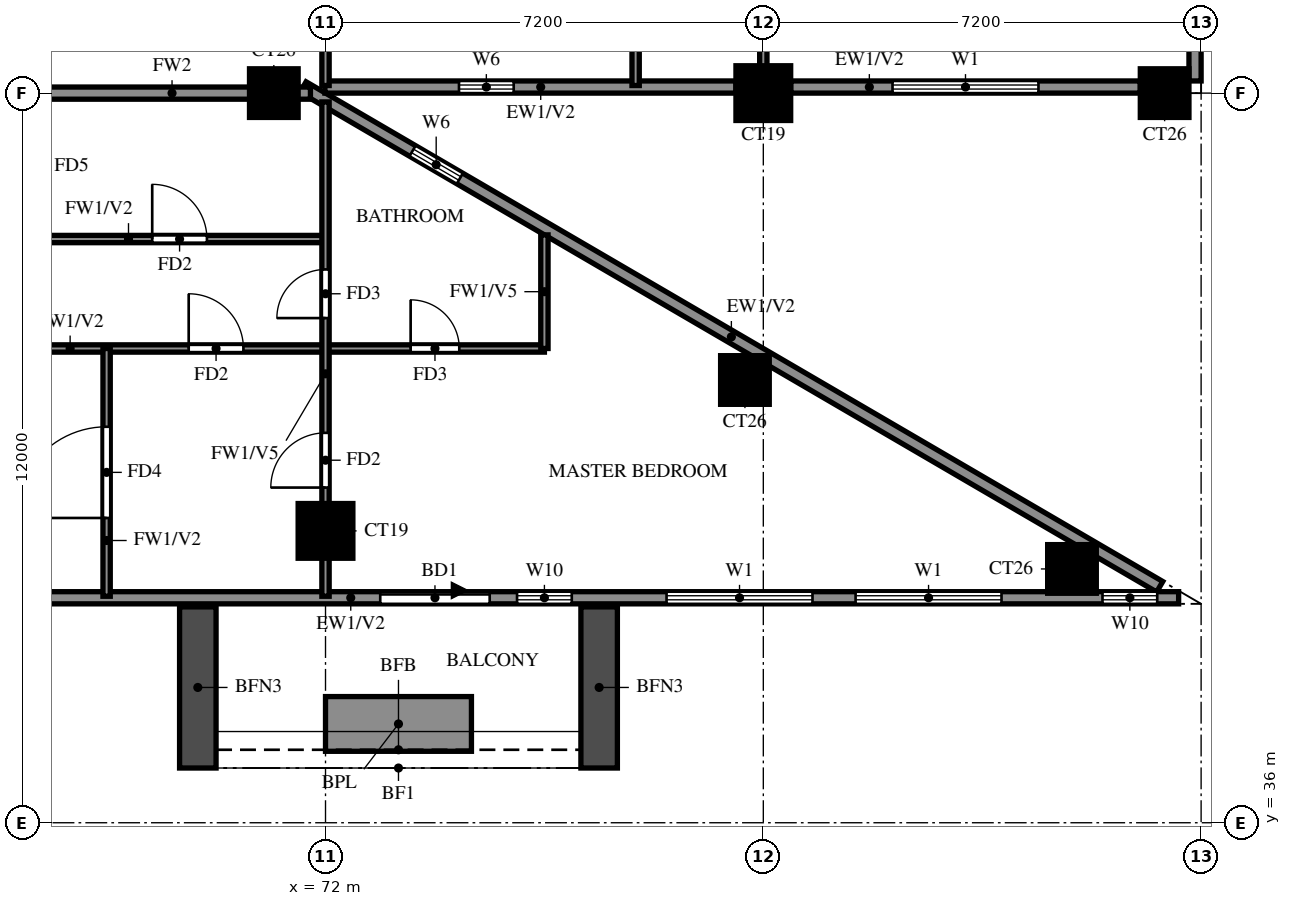
"""IFC4 building model, lengths in metres.
Left out: names, types, materials, properties, quantities, classifications, styles, units other than length and angle.
Written with IfcOpenShell. Run it as: python <this file> out.ifc"""

import sys

from ifc_helpers import new_model, si_unit, direction, frame, frame_2d, origin, origin_2d, place, context, subcontext, project, spatial, rectangle, extrude, source, transform, mapped, element, fill, save


model = new_model("IFC4")
c1 = context("Model", 3, precision=1e-05, world=origin(), true_north=direction((0.0, 1.0)))
c2 = subcontext(c1, "Body", "Model", "MODEL_VIEW")
j1 = project(units=[si_unit("LENGTHUNIT", "METRE"), si_unit("PLANEANGLEUNIT", "RADIAN")], contexts=[c1])
p1 = place(None, origin())
s1 = spatial("IfcSite", under=j1, at=p1, CompositionType="ELEMENT")
p2 = place(p1, origin())
s2 = spatial("IfcBuilding", under=s1, at=p2, CompositionType="ELEMENT")
p3 = place(p2, frame((0.0, 0.0, 181.5)))
s3 = spatial("IfcBuildingStorey", under=s2, at=p3, CompositionType="ELEMENT", Elevation=181.5)
m1 = source(origin(), c2, "Body", "SweptSolid", [
    extrude(rectangle(XDim=0.8, YDim=0.8, at=origin_2d()), origin(), (0.0, 0.0, 1.0), 3.2),
])
p4 = place(p3, frame((84.276, 40.174, 0.0), z_axis=(0.0, 0.0, 1.0), x_axis=(1.0, 0.0, 0.0)))
e1 = element("IfcColumn", 1, at=p4, inside=s3, PredefinedType="COLUMN", context=c2, shape_type="MappedRepresentation", body=[
    mapped(m1, transform((0.0, 0.0, 0.0))),
])
m2 = source(origin(), c2, "Body", "SweptSolid", [
    extrude(rectangle(XDim=0.9, YDim=0.9, at=origin_2d()), origin(), (0.0, 0.0, 1.0), 3.2),
])
p5 = place(p3, frame((72.0, 40.8, 0.0), z_axis=(0.0, 0.0, 1.0), x_axis=(1.0, 0.0, 0.0)))
e2 = element("IfcColumn", 2, at=p5, inside=s3, PredefinedType="COLUMN", context=c2, shape_type="MappedRepresentation", body=[
    mapped(m2, transform((0.0, 0.0, 0.0))),
])
for number, where, z_axis, x_axis in (
    (3, (78.898, 43.282, 0.0), (0.0, 0.0, 1.0), (1.0, 0.0, 0.0)),
    (4, (71.15, 48.0, 0.0), (0.0, 0.0, 1.0), (1.0, 0.0, 0.0)),
):
    element("IfcColumn", number, at=place(p3, frame(where, z_axis=z_axis, x_axis=x_axis)), inside=s3, PredefinedType="COLUMN", context=c2, shape_type="MappedRepresentation", body=[
        mapped(m1, transform((0.0, 0.0, 0.0))),
    ])
p6 = place(p3, frame((79.2, 48.0, 0.0), z_axis=(0.0, 0.0, 1.0), x_axis=(1.0, 0.0, 0.0)))
e5 = element("IfcColumn", 5, at=p6, inside=s3, PredefinedType="COLUMN", context=c2, shape_type="MappedRepresentation", body=[
    mapped(m2, transform((0.0, 0.0, 0.0))),
])
p7 = place(p3, frame((85.8, 48.0, 0.0), z_axis=(0.0, 0.0, 1.0), x_axis=(1.0, 0.0, 0.0)))
e6 = element("IfcColumn", 6, at=p7, inside=s3, PredefinedType="COLUMN", context=c2, shape_type="MappedRepresentation", body=[
    mapped(m1, transform((0.0, 0.0, 0.0))),
])
p8 = place(p3, frame((85.719, 39.881, 0.0), z_axis=(0.0, 0.0, 1.0), x_axis=(-0.86377618652, 0.503875678716, 0.0)))
e7 = element("IfcWall", 7, at=p8, inside=s3, PredefinedType="SOLIDWALL", context=c2, shape_type="SweptSolid", body=[
    extrude(rectangle(XDim=16.311, YDim=0.2, at=frame_2d((8.156, 0.0))), origin(), (0.0, 0.0, 1.0), 3.2),
])
p9 = place(p8, frame((13.326, 0.0, 1.5)))
e8 = element("IfcOpeningElement", 8, at=p9, cuts=e7, PredefinedType="OPENING", context=c2, shape_type="SweptSolid", body=[
    extrude(rectangle(XDim=0.9, YDim=0.9, at=frame_2d((0.45, 0.45))), frame((0.0, 0.11, 0.0), z_axis=(0.0, -1.0, 0.0), x_axis=(1.0, 0.0, 0.0)), (0.0, 0.0, 1.0), 0.22),
])
p10 = place(p3, frame((71.99, 48.1, 0.0), z_axis=(0.0, 0.0, 1.0), x_axis=(1.0, 0.0, 0.0)))
e9 = element("IfcWall", 9, at=p10, inside=s3, PredefinedType="SOLIDWALL", context=c2, shape_type="SweptSolid", body=[
    extrude(rectangle(XDim=6.76, YDim=0.2, at=frame_2d((3.38, 0.0))), origin(), (0.0, 0.0, 1.0), 3.2),
])
p11 = place(p10, frame((2.205, 0.0, 1.5)))
e10 = element("IfcOpeningElement", 10, at=p11, cuts=e9, PredefinedType="OPENING", context=c2, shape_type="SweptSolid", body=[
    extrude(rectangle(XDim=0.9, YDim=0.9, at=frame_2d((0.45, 0.45))), frame((0.0, 0.11, 0.0), z_axis=(0.0, -1.0, 0.0), x_axis=(1.0, 0.0, 0.0)), (0.0, 0.0, 1.0), 0.22),
])
p12 = place(p3, frame((79.65, 48.1, 0.0), z_axis=(0.0, 0.0, 1.0), x_axis=(1.0, 0.0, 0.0)))
e11 = element("IfcWall", 11, at=p12, inside=s3, PredefinedType="SOLIDWALL", context=c2, shape_type="SweptSolid", body=[
    extrude(rectangle(XDim=5.75, YDim=0.2, at=frame_2d((2.875, 0.0))), origin(), (0.0, 0.0, 1.0), 3.2),
])
p13 = place(p12, frame((1.675, 0.0, 0.6)))
e12 = element("IfcOpeningElement", 12, at=p13, cuts=e11, PredefinedType="OPENING", context=c2, shape_type="SweptSolid", body=[
    extrude(rectangle(XDim=2.4, YDim=2.4, at=frame_2d((1.2, 1.2))), frame((0.0, 0.11, 0.0), z_axis=(0.0, -1.0, 0.0), x_axis=(1.0, 0.0, 0.0)), (0.0, 0.0, 1.0), 0.22),
])
p14 = place(p3, frame((86.3, 48.2, 0.0), z_axis=(0.0, 0.0, 1.0), x_axis=(0.0, 1.0, 0.0)))
e13 = element("IfcWall", 13, at=p14, inside=s3, PredefinedType="SOLIDWALL", context=c2, shape_type="SweptSolid", body=[
    extrude(rectangle(XDim=7.0, YDim=0.2, at=frame_2d((3.5, 0.0))), origin(), (0.0, 0.0, 1.0), 3.2),
])
p15 = place(p14, frame((0.783, 0.0, 0.6)))
e14 = element("IfcOpeningElement", 14, at=p15, cuts=e13, PredefinedType="OPENING", context=c2, shape_type="SweptSolid", body=[
    extrude(rectangle(XDim=2.4, YDim=2.4, at=frame_2d((1.2, 1.2))), frame((0.0, 0.11, 0.0), z_axis=(0.0, -1.0, 0.0), x_axis=(1.0, 0.0, 0.0)), (0.0, 0.0, 1.0), 0.22),
])
p16 = place(p14, frame((3.667, 0.0, 0.6)))
e15 = element("IfcOpeningElement", 15, at=p16, cuts=e13, PredefinedType="OPENING", context=c2, shape_type="SweptSolid", body=[
    extrude(rectangle(XDim=2.4, YDim=2.4, at=frame_2d((1.2, 1.2))), frame((0.0, 0.11, 0.0), z_axis=(0.0, -1.0, 0.0), x_axis=(1.0, 0.0, 0.0)), (0.0, 0.0, 1.0), 0.22),
])
p17 = place(p3, frame((58.8, 39.7, 0.0), z_axis=(0.0, 0.0, 1.0), x_axis=(1.0, 0.0, 0.0)))
e16 = element("IfcWall", 16, at=p17, inside=s3, PredefinedType="SOLIDWALL", context=c2, shape_type="SweptSolid", body=[
    extrude(rectangle(XDim=27.23, YDim=0.2, at=frame_2d((13.615, 0.0))), origin(), (0.0, 0.0, 1.0), 3.2),
])
p18 = place(p17, frame((14.1, 0.0, 0.0)))
e17 = element("IfcOpeningElement", 17, at=p18, cuts=e16, PredefinedType="OPENING", context=c2, shape_type="SweptSolid", body=[
    extrude(rectangle(XDim=1.8, YDim=2.4, at=frame_2d((0.9, 1.2))), frame((0.0, 0.11, 0.0), z_axis=(0.0, -1.0, 0.0), x_axis=(1.0, 0.0, 0.0)), (0.0, 0.0, 1.0), 0.22),
])
p19 = place(p17, frame((2.433, 0.0, 0.6)))
e18 = element("IfcOpeningElement", 18, at=p19, cuts=e16, PredefinedType="OPENING", context=c2, shape_type="SweptSolid", body=[
    extrude(rectangle(XDim=2.4, YDim=2.4, at=frame_2d((1.2, 1.2))), frame((0.0, 0.11, 0.0), z_axis=(0.0, -1.0, 0.0), x_axis=(1.0, 0.0, 0.0)), (0.0, 0.0, 1.0), 0.22),
])
p20 = place(p17, frame((5.967, 0.0, 0.6)))
e19 = element("IfcOpeningElement", 19, at=p20, cuts=e16, PredefinedType="OPENING", context=c2, shape_type="SweptSolid", body=[
    extrude(rectangle(XDim=2.4, YDim=2.4, at=frame_2d((1.2, 1.2))), frame((0.0, 0.11, 0.0), z_axis=(0.0, -1.0, 0.0), x_axis=(1.0, 0.0, 0.0)), (0.0, 0.0, 1.0), 0.22),
])
p21 = place(p17, frame((16.35, 0.0, 0.6)))
e20 = element("IfcOpeningElement", 20, at=p21, cuts=e16, PredefinedType="OPENING", context=c2, shape_type="SweptSolid", body=[
    extrude(rectangle(XDim=0.9, YDim=2.4, at=frame_2d((0.45, 1.2))), frame((0.0, 0.11, 0.0), z_axis=(0.0, -1.0, 0.0), x_axis=(1.0, 0.0, 0.0)), (0.0, 0.0, 1.0), 0.22),
])
p22 = place(p17, frame((18.809, 0.0, 0.6)))
e21 = element("IfcOpeningElement", 21, at=p22, cuts=e16, PredefinedType="OPENING", context=c2, shape_type="SweptSolid", body=[
    extrude(rectangle(XDim=2.4, YDim=2.4, at=frame_2d((1.2, 1.2))), frame((0.0, 0.11, 0.0), z_axis=(0.0, -1.0, 0.0), x_axis=(1.0, 0.0, 0.0)), (0.0, 0.0, 1.0), 0.22),
])
p23 = place(p17, frame((21.917, 0.0, 0.6)))
e22 = element("IfcOpeningElement", 22, at=p23, cuts=e16, PredefinedType="OPENING", context=c2, shape_type="SweptSolid", body=[
    extrude(rectangle(XDim=2.4, YDim=2.4, at=frame_2d((1.2, 1.2))), frame((0.0, 0.11, 0.0), z_axis=(0.0, -1.0, 0.0), x_axis=(1.0, 0.0, 0.0)), (0.0, 0.0, 1.0), 0.22),
])
p24 = place(p17, frame((25.978, 0.0, 0.6)))
e23 = element("IfcOpeningElement", 23, at=p24, cuts=e16, PredefinedType="OPENING", context=c2, shape_type="SweptSolid", body=[
    extrude(rectangle(XDim=0.9, YDim=2.4, at=frame_2d((0.45, 1.2))), frame((0.0, 0.11, 0.0), z_axis=(0.0, -1.0, 0.0), x_axis=(1.0, 0.0, 0.0)), (0.0, 0.0, 1.0), 0.22),
])
for number, where, z_axis, x_axis in (
    (24, (69.9, 39.55, 0.0), (0.0, 0.0, 1.0), (0.0, -1.0, 0.0)),
    (25, (76.5, 39.55, 0.0), (0.0, 0.0, 1.0), (0.0, -1.0, 0.0)),
):
    element("IfcWall", number, at=place(p3, frame(where, z_axis=z_axis, x_axis=x_axis)), inside=s3, PredefinedType="SOLIDWALL", context=c2, shape_type="SweptSolid", body=[
        extrude(rectangle(XDim=2.65, YDim=0.6, at=frame_2d((1.325, 0.0))), origin(), (0.0, 0.0, 1.0), 2.85),
    ])
p25 = place(p3, frame((72.0, 37.625, 0.0), z_axis=(0.0, 0.0, 1.0), x_axis=(1.0, 0.0, 0.0)))
e26 = element("IfcWall", 26, at=p25, inside=s3, PredefinedType="SOLIDWALL", context=c2, shape_type="SweptSolid", body=[
    extrude(rectangle(XDim=2.4, YDim=0.9, at=frame_2d((1.2, 0.0))), origin(), (0.0, 0.0, 1.0), 0.9),
])
p26 = place(p3, frame((67.2, 48.0, 0.0), z_axis=(0.0, 0.0, 1.0), x_axis=(1.0, 0.0, 0.0)))
e27 = element("IfcWall", 27, at=p26, inside=s3, PredefinedType="SOLIDWALL", context=c2, shape_type="SweptSolid", body=[
    extrude(rectangle(XDim=4.552, YDim=0.2, at=frame_2d((2.276, 0.0))), origin(), (0.0, 0.0, 1.0), 3.2),
])
p27 = place(p3, frame((60.0, 43.8, 0.0), z_axis=(0.0, 0.0, 1.0), x_axis=(1.0, 0.0, 0.0)))
e28 = element("IfcWall", 28, at=p27, inside=s3, PredefinedType="PARTITIONING", context=c2, shape_type="SweptSolid", body=[
    extrude(rectangle(XDim=15.6, YDim=0.12, at=frame_2d((7.8, 0.0))), origin(), (0.0, 0.0, 1.0), 3.2),
])
p28 = place(p27, frame((9.75, 0.0, 0.0)))
e29 = element("IfcOpeningElement", 29, at=p28, cuts=e28, PredefinedType="OPENING", context=c2, shape_type="SweptSolid", body=[
    extrude(rectangle(XDim=0.9, YDim=2.1, at=frame_2d((0.45, 1.05))), frame((0.0, 0.07, 0.0), z_axis=(0.0, -1.0, 0.0), x_axis=(1.0, 0.0, 0.0)), (0.0, 0.0, 1.0), 0.14),
])
p29 = place(p27, frame((3.45, 0.0, 0.0)))
e30 = element("IfcOpeningElement", 30, at=p29, cuts=e28, PredefinedType="OPENING", context=c2, shape_type="SweptSolid", body=[
    extrude(rectangle(XDim=1.5, YDim=2.1, at=frame_2d((0.75, 1.05))), frame((0.0, 0.07, 0.0), z_axis=(0.0, -1.0, 0.0), x_axis=(1.0, 0.0, 0.0)), (0.0, 0.0, 1.0), 0.14),
])
p30 = place(p27, frame((13.4, 0.0, 0.0)))
e31 = element("IfcOpeningElement", 31, at=p30, cuts=e28, PredefinedType="OPENING", context=c2, shape_type="SweptSolid", body=[
    extrude(rectangle(XDim=0.8, YDim=2.1, at=frame_2d((0.4, 1.05))), frame((0.0, 0.07, 0.0), z_axis=(0.0, -1.0, 0.0), x_axis=(1.0, 0.0, 0.0)), (0.0, 0.0, 1.0), 0.14),
])
p31 = place(p3, frame((67.2, 45.6, 0.0), z_axis=(0.0, 0.0, 1.0), x_axis=(1.0, 0.0, 0.0)))
e32 = element("IfcWall", 32, at=p31, inside=s3, PredefinedType="PARTITIONING", context=c2, shape_type="SweptSolid", body=[
    extrude(rectangle(XDim=4.8, YDim=0.12, at=frame_2d((2.4, 0.0))), origin(), (0.0, 0.0, 1.0), 3.2),
])
p32 = place(p31, frame((1.95, 0.0, 0.0)))
e33 = element("IfcOpeningElement", 33, at=p32, cuts=e32, PredefinedType="OPENING", context=c2, shape_type="SweptSolid", body=[
    extrude(rectangle(XDim=0.9, YDim=2.1, at=frame_2d((0.45, 1.05))), frame((0.0, 0.07, 0.0), z_axis=(0.0, -1.0, 0.0), x_axis=(1.0, 0.0, 0.0)), (0.0, 0.0, 1.0), 0.14),
])
p33 = place(p3, frame((68.4, 39.725, 0.0), z_axis=(0.0, 0.0, 1.0), x_axis=(0.0, 1.0, 0.0)))
e34 = element("IfcWall", 34, at=p33, inside=s3, PredefinedType="PARTITIONING", context=c2, shape_type="SweptSolid", body=[
    extrude(rectangle(XDim=4.075, YDim=0.12, at=frame_2d((2.038, 0.0))), origin(), (0.0, 0.0, 1.0), 3.2),
])
p34 = place(p33, frame((1.288, 0.0, 0.0)))
e35 = element("IfcOpeningElement", 35, at=p34, cuts=e34, PredefinedType="OPENING", context=c2, shape_type="SweptSolid", body=[
    extrude(rectangle(XDim=1.5, YDim=2.1, at=frame_2d((0.75, 1.05))), frame((0.0, 0.07, 0.0), z_axis=(0.0, -1.0, 0.0), x_axis=(1.0, 0.0, 0.0)), (0.0, 0.0, 1.0), 0.14),
])
p35 = place(p3, frame((72.0, 39.725, 0.0), z_axis=(0.0, 0.0, 1.0), x_axis=(0.0, 1.0, 0.0)))
e36 = element("IfcWall", 36, at=p35, inside=s3, PredefinedType="PARTITIONING", context=c2, shape_type="SweptSolid", body=[
    extrude(rectangle(XDim=8.13, YDim=0.12, at=frame_2d((4.065, 0.0))), origin(), (0.0, 0.0, 1.0), 2.3),
])
p36 = place(p35, frame((1.788, 0.0, 0.0)))
e37 = element("IfcOpeningElement", 37, at=p36, cuts=e36, PredefinedType="OPENING", context=c2, shape_type="SweptSolid", body=[
    extrude(rectangle(XDim=0.9, YDim=2.1, at=frame_2d((0.45, 1.05))), frame((0.0, 0.07, 0.0), z_axis=(0.0, -1.0, 0.0), x_axis=(1.0, 0.0, 0.0)), (0.0, 0.0, 1.0), 0.14),
])
p37 = place(p35, frame((4.575, 0.0, 0.0)))
e38 = element("IfcOpeningElement", 38, at=p37, cuts=e36, PredefinedType="OPENING", context=c2, shape_type="SweptSolid", body=[
    extrude(rectangle(XDim=0.8, YDim=2.1, at=frame_2d((0.4, 1.05))), frame((0.0, 0.07, 0.0), z_axis=(0.0, -1.0, 0.0), x_axis=(1.0, 0.0, 0.0)), (0.0, 0.0, 1.0), 0.14),
])
p38 = place(p3, frame((72.0, 48.125, 0.0), z_axis=(0.0, 0.0, 1.0), x_axis=(0.0, 1.0, 0.0)))
e39 = element("IfcWall", 39, at=p38, inside=s3, PredefinedType="PARTITIONING", context=c2, shape_type="SweptSolid", body=[
    extrude(rectangle(XDim=3.475, YDim=0.12, at=frame_2d((1.738, 0.0))), origin(), (0.0, 0.0, 1.0), 3.2),
])
p39 = place(p3, frame((75.6, 43.8, 0.0), z_axis=(0.0, 0.0, 1.0), x_axis=(0.0, 1.0, 0.0)))
e40 = element("IfcWall", 40, at=p39, inside=s3, PredefinedType="PARTITIONING", context=c2, shape_type="SweptSolid", body=[
    extrude(rectangle(XDim=1.868, YDim=0.12, at=frame_2d((0.934, 0.0))), origin(), (0.0, 0.0, 1.0), 2.3),
])
p40 = place(p3, frame((77.1, 48.125, 0.0), z_axis=(0.0, 0.0, 1.0), x_axis=(0.0, 1.0, 0.0)))
e41 = element("IfcWall", 41, at=p40, inside=s3, PredefinedType="PARTITIONING", context=c2, shape_type="SweptSolid", body=[
    extrude(rectangle(XDim=3.475, YDim=0.12, at=frame_2d((1.738, 0.0))), origin(), (0.0, 0.0, 1.0), 3.2),
])
p41 = place(p3, frame((79.2, 48.125, 0.0), z_axis=(0.0, 0.0, 1.0), x_axis=(0.0, 1.0, 0.0)))
e42 = element("IfcWall", 42, at=p41, inside=s3, PredefinedType="PARTITIONING", context=c2, shape_type="SweptSolid", body=[
    extrude(rectangle(XDim=21.475, YDim=0.12, at=frame_2d((10.738, 0.0))), origin(), (0.0, 0.0, 1.0), 3.2),
])
p42 = place(p41, frame((2.788, 0.0, 0.0)))
e43 = element("IfcOpeningElement", 43, at=p42, cuts=e42, PredefinedType="OPENING", context=c2, shape_type="SweptSolid", body=[
    extrude(rectangle(XDim=1.5, YDim=2.1, at=frame_2d((0.75, 1.05))), frame((0.0, 0.07, 0.0), z_axis=(0.0, -1.0, 0.0), x_axis=(1.0, 0.0, 0.0)), (0.0, 0.0, 1.0), 0.14),
])
p43 = place(p41, frame((8.425, 0.0, 0.0)))
e44 = element("IfcOpeningElement", 44, at=p43, cuts=e42, PredefinedType="OPENING", context=c2, shape_type="SweptSolid", body=[
    extrude(rectangle(XDim=0.9, YDim=2.1, at=frame_2d((0.45, 1.05))), frame((0.0, 0.07, 0.0), z_axis=(0.0, -1.0, 0.0), x_axis=(1.0, 0.0, 0.0)), (0.0, 0.0, 1.0), 0.14),
])
p44 = place(p41, frame((12.025, 0.0, 0.0)))
e45 = element("IfcOpeningElement", 45, at=p44, cuts=e42, PredefinedType="OPENING", context=c2, shape_type="SweptSolid", body=[
    extrude(rectangle(XDim=0.9, YDim=2.1, at=frame_2d((0.45, 1.05))), frame((0.0, 0.07, 0.0), z_axis=(0.0, -1.0, 0.0), x_axis=(1.0, 0.0, 0.0)), (0.0, 0.0, 1.0), 0.14),
])
p45 = place(p41, frame((17.425, 0.0, 0.0)))
e46 = element("IfcOpeningElement", 46, at=p45, cuts=e42, PredefinedType="OPENING", context=c2, shape_type="SweptSolid", body=[
    extrude(rectangle(XDim=0.9, YDim=2.1, at=frame_2d((0.45, 1.05))), frame((0.0, 0.07, 0.0), z_axis=(0.0, -1.0, 0.0), x_axis=(1.0, 0.0, 0.0)), (0.0, 0.0, 1.0), 0.14),
])
p46 = place(p9, origin())
e47 = element("IfcWindow", 47, at=p46, inside=s3, PartitioningType="SINGLE_PANEL", PredefinedType="WINDOW", context=c2, shape_type="SweptSolid", body=[
    extrude(rectangle(XDim=0.9, YDim=0.9, at=frame_2d((0.45, 0.45))), frame((0.0, 0.03, 0.0), z_axis=(0.0, -1.0, 0.0), x_axis=(1.0, 0.0, 0.0)), (0.0, 0.0, 1.0), 0.06),
])
fill(e8, e47)
p47 = place(p11, origin())
e48 = element("IfcWindow", 48, at=p47, inside=s3, PartitioningType="SINGLE_PANEL", PredefinedType="WINDOW", context=c2, shape_type="SweptSolid", body=[
    extrude(rectangle(XDim=0.9, YDim=0.9, at=frame_2d((0.45, 0.45))), frame((0.0, 0.03, 0.0), z_axis=(0.0, -1.0, 0.0), x_axis=(1.0, 0.0, 0.0)), (0.0, 0.0, 1.0), 0.06),
])
fill(e10, e48)
p48 = place(p13, origin())
e49 = element("IfcWindow", 49, at=p48, inside=s3, PartitioningType="DOUBLE_PANEL_VERTICAL", PredefinedType="WINDOW", context=c2, shape_type="SweptSolid", body=[
    extrude(rectangle(XDim=2.4, YDim=2.4, at=frame_2d((1.2, 1.2))), frame((0.0, 0.03, 0.0), z_axis=(0.0, -1.0, 0.0), x_axis=(1.0, 0.0, 0.0)), (0.0, 0.0, 1.0), 0.06),
])
fill(e12, e49)
p49 = place(p18, origin())
e50 = element("IfcDoor", 50, at=p49, inside=s3, OperationType="DOUBLE_DOOR_SLIDING", PredefinedType="DOOR", context=c2, shape_type="SweptSolid", body=[
    extrude(rectangle(XDim=1.8, YDim=2.4, at=frame_2d((0.9, 1.2))), frame((0.0, 0.025, 0.0), z_axis=(0.0, -1.0, 0.0), x_axis=(1.0, 0.0, 0.0)), (0.0, 0.0, 1.0), 0.05),
])
fill(e17, e50)
p50 = place(p21, origin())
e51 = element("IfcWindow", 51, at=p50, inside=s3, PartitioningType="SINGLE_PANEL", PredefinedType="WINDOW", context=c2, shape_type="SweptSolid", body=[
    extrude(rectangle(XDim=0.9, YDim=2.4, at=frame_2d((0.45, 1.2))), frame((0.0, 0.03, 0.0), z_axis=(0.0, -1.0, 0.0), x_axis=(1.0, 0.0, 0.0)), (0.0, 0.0, 1.0), 0.06),
])
fill(e20, e51)
p51 = place(p22, origin())
e52 = element("IfcWindow", 52, at=p51, inside=s3, PartitioningType="DOUBLE_PANEL_VERTICAL", PredefinedType="WINDOW", context=c2, shape_type="SweptSolid", body=[
    extrude(rectangle(XDim=2.4, YDim=2.4, at=frame_2d((1.2, 1.2))), frame((0.0, 0.03, 0.0), z_axis=(0.0, -1.0, 0.0), x_axis=(1.0, 0.0, 0.0)), (0.0, 0.0, 1.0), 0.06),
])
fill(e21, e52)
p52 = place(p23, origin())
e53 = element("IfcWindow", 53, at=p52, inside=s3, PartitioningType="DOUBLE_PANEL_VERTICAL", PredefinedType="WINDOW", context=c2, shape_type="SweptSolid", body=[
    extrude(rectangle(XDim=2.4, YDim=2.4, at=frame_2d((1.2, 1.2))), frame((0.0, 0.03, 0.0), z_axis=(0.0, -1.0, 0.0), x_axis=(1.0, 0.0, 0.0)), (0.0, 0.0, 1.0), 0.06),
])
fill(e22, e53)
p53 = place(p24, origin())
e54 = element("IfcWindow", 54, at=p53, inside=s3, PartitioningType="SINGLE_PANEL", PredefinedType="WINDOW", context=c2, shape_type="SweptSolid", body=[
    extrude(rectangle(XDim=0.9, YDim=2.4, at=frame_2d((0.45, 1.2))), frame((0.0, 0.03, 0.0), z_axis=(0.0, -1.0, 0.0), x_axis=(1.0, 0.0, 0.0)), (0.0, 0.0, 1.0), 0.06),
])
fill(e23, e54)
p54 = place(p34, origin())
e55 = element("IfcDoor", 55, at=p54, inside=s3, OperationType="SINGLE_SWING_LEFT", PredefinedType="DOOR", context=c2, shape_type="SweptSolid", body=[
    extrude(rectangle(XDim=1.5, YDim=2.1, at=frame_2d((0.75, 1.05))), frame((0.0, 0.025, 0.0), z_axis=(0.0, -1.0, 0.0), x_axis=(1.0, 0.0, 0.0)), (0.0, 0.0, 1.0), 0.05),
])
fill(e35, e55)
p55 = place(p32, origin())
e56 = element("IfcDoor", 56, at=p55, inside=s3, OperationType="SINGLE_SWING_RIGHT", PredefinedType="DOOR", context=c2, shape_type="SweptSolid", body=[
    extrude(rectangle(XDim=0.9, YDim=2.1, at=frame_2d((0.45, 1.05))), frame((0.0, 0.025, 0.0), z_axis=(0.0, -1.0, 0.0), x_axis=(1.0, 0.0, 0.0)), (0.0, 0.0, 1.0), 0.05),
])
fill(e33, e56)
p56 = place(p28, origin())
e57 = element("IfcDoor", 57, at=p56, inside=s3, OperationType="SINGLE_SWING_LEFT", PredefinedType="DOOR", context=c2, shape_type="SweptSolid", body=[
    extrude(rectangle(XDim=0.9, YDim=2.1, at=frame_2d((0.45, 1.05))), frame((0.0, 0.025, 0.0), z_axis=(0.0, -1.0, 0.0), x_axis=(1.0, 0.0, 0.0)), (0.0, 0.0, 1.0), 0.05),
])
fill(e29, e57)
p57 = place(p36, origin())
e58 = element("IfcDoor", 58, at=p57, inside=s3, OperationType="SINGLE_SWING_RIGHT", PredefinedType="DOOR", context=c2, shape_type="SweptSolid", body=[
    extrude(rectangle(XDim=0.9, YDim=2.1, at=frame_2d((0.45, 1.05))), frame((0.0, 0.025, 0.0), z_axis=(0.0, -1.0, 0.0), x_axis=(1.0, 0.0, 0.0)), (0.0, 0.0, 1.0), 0.05),
])
fill(e37, e58)
p58 = place(p37, origin())
e59 = element("IfcDoor", 59, at=p58, inside=s3, OperationType="SINGLE_SWING_LEFT", PredefinedType="DOOR", context=c2, shape_type="SweptSolid", body=[
    extrude(rectangle(XDim=0.8, YDim=2.1, at=frame_2d((0.4, 1.05))), frame((0.0, 0.025, 0.0), z_axis=(0.0, -1.0, 0.0), x_axis=(1.0, 0.0, 0.0)), (0.0, 0.0, 1.0), 0.05),
])
fill(e38, e59)
p59 = place(p30, origin())
e60 = element("IfcDoor", 60, at=p59, inside=s3, OperationType="SINGLE_SWING_RIGHT", PredefinedType="DOOR", context=c2, shape_type="SweptSolid", body=[
    extrude(rectangle(XDim=0.8, YDim=2.1, at=frame_2d((0.4, 1.05))), frame((0.0, 0.025, 0.0), z_axis=(0.0, -1.0, 0.0), x_axis=(1.0, 0.0, 0.0)), (0.0, 0.0, 1.0), 0.05),
])
fill(e31, e60)
save(model, sys.argv[1])
